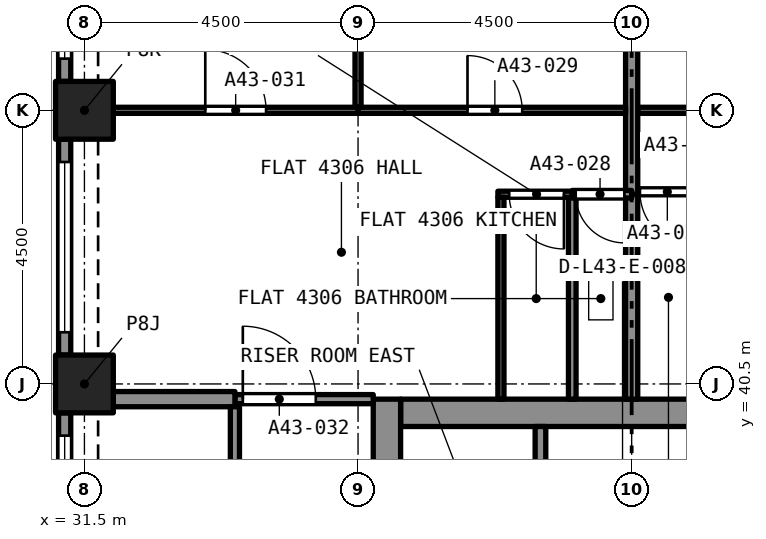
"""IFC4 building model, lengths in metres.
Left out: names, types, materials, properties, quantities, classifications, styles, units other than length and angle.
Written with IfcOpenShell. Run it as: python <this file> out.ifc"""

import sys

from ifc_helpers import new_model, si_unit, direction, frame, frame_2d, origin, origin_2d, place, context, subcontext, project, spatial, rectangle, extrude, element, fill, save


model = new_model("IFC4")
c1 = context("Model", 3, precision=1e-05, world=origin(), true_north=direction((0.0, 1.0)))
c2 = subcontext(c1, "Body", "Model", "MODEL_VIEW")
j1 = project(units=[si_unit("LENGTHUNIT", "METRE"), si_unit("PLANEANGLEUNIT", "RADIAN")], contexts=[c1])
p1 = place(None, origin())
s1 = spatial("IfcSite", under=j1, at=p1, CompositionType="ELEMENT")
p2 = place(p1, origin())
s2 = spatial("IfcBuilding", under=s1, at=p2, CompositionType="ELEMENT")
p3 = place(p2, frame((0.0, 0.0, 155.0)))
s3 = spatial("IfcBuildingStorey", under=s2, at=p3, CompositionType="ELEMENT", Elevation=155.0)
for number, where, z_axis, x_axis in (
    (1, (31.5, 40.5, 0.0), (0.0, 0.0, 1.0), (1.0, 0.0, 0.0)),
    (2, (31.5, 45.0, 0.0), (0.0, 0.0, 1.0), (1.0, 0.0, 0.0)),
):
    element("IfcColumn", number, at=place(p3, frame(where, z_axis=z_axis, x_axis=x_axis)), inside=s3, PredefinedType="COLUMN", context=c2, shape_type="SweptSolid", body=[
        extrude(rectangle(XDim=0.95, YDim=0.95, at=origin_2d()), origin(), (0.0, 0.0, 1.0), 4.4),
    ])
p4 = place(p3, frame((36.7, 40.025, 0.0), z_axis=(0.0, 0.0, 1.0), x_axis=(1.0, 0.0, 0.0)))
e3 = element("IfcWall", 3, at=p4, inside=s3, PredefinedType="SOLIDWALL", context=c2, shape_type="SweptSolid", body=[
    extrude(rectangle(XDim=7.6, YDim=0.45, at=frame_2d((3.8, 0.0))), origin(), (0.0, 0.0, 1.0), 4.4),
])
p5 = place(p3, frame((36.475, 27.25, 0.0), z_axis=(0.0, 0.0, 1.0), x_axis=(0.0, 1.0, 0.0)))
e4 = element("IfcWall", 4, at=p5, inside=s3, PredefinedType="SOLIDWALL", context=c2, shape_type="SweptSolid", body=[
    extrude(rectangle(XDim=13.0, YDim=0.45, at=frame_2d((6.5, 0.0))), origin(), (0.0, 0.0, 1.0), 4.4),
])
p6 = place(p5, frame((8.7, 0.0, 0.0)))
e5 = element("IfcOpeningElement", 5, at=p6, cuts=e4, PredefinedType="OPENING", context=c2, shape_type="SweptSolid", body=[
    extrude(rectangle(XDim=1.2, YDim=2.1, at=frame_2d((0.6, 1.05))), frame((0.0, 0.235, 0.0), z_axis=(0.0, -1.0, 0.0), x_axis=(1.0, 0.0, 0.0)), (0.0, 0.0, 1.0), 0.47),
])
p7 = place(p3, frame((31.175, 45.475, 0.0), z_axis=(0.0, 0.0, 1.0), x_axis=(0.0, 1.0, 0.0)))
e6 = element("IfcWall", 6, at=p7, inside=s3, PredefinedType="SOLIDWALL", context=c2, shape_type="SweptSolid", body=[
    extrude(rectangle(XDim=3.55, YDim=0.2, at=frame_2d((1.775, 0.0))), origin(), (0.0, 0.0, 1.0), 4.4),
])
p8 = place(p7, frame((0.375, 0.0, 0.45)))
e7 = element("IfcOpeningElement", 7, at=p8, cuts=e6, PredefinedType="OPENING", context=c2, shape_type="SweptSolid", body=[
    extrude(rectangle(XDim=2.8, YDim=2.55, at=frame_2d((1.4, 1.275))), frame((0.0, 0.11, 0.0), z_axis=(0.0, -1.0, 0.0), x_axis=(1.0, 0.0, 0.0)), (0.0, 0.0, 1.0), 0.22),
])
p9 = place(p3, frame((31.175, 40.975, 0.0), z_axis=(0.0, 0.0, 1.0), x_axis=(0.0, 1.0, 0.0)))
e8 = element("IfcWall", 8, at=p9, inside=s3, PredefinedType="SOLIDWALL", context=c2, shape_type="SweptSolid", body=[
    extrude(rectangle(XDim=3.55, YDim=0.2, at=frame_2d((1.775, 0.0))), origin(), (0.0, 0.0, 1.0), 4.4),
])
p10 = place(p9, frame((0.375, 0.0, 0.45)))
e9 = element("IfcOpeningElement", 9, at=p10, cuts=e8, PredefinedType="OPENING", context=c2, shape_type="SweptSolid", body=[
    extrude(rectangle(XDim=2.8, YDim=2.55, at=frame_2d((1.4, 1.275))), frame((0.0, 0.11, 0.0), z_axis=(0.0, -1.0, 0.0), x_axis=(1.0, 0.0, 0.0)), (0.0, 0.0, 1.0), 0.22),
])
p11 = place(p3, frame((31.175, 36.475, 0.0), z_axis=(0.0, 0.0, 1.0), x_axis=(0.0, 1.0, 0.0)))
e10 = element("IfcWall", 10, at=p11, inside=s3, PredefinedType="SOLIDWALL", context=c2, shape_type="SweptSolid", body=[
    extrude(rectangle(XDim=3.55, YDim=0.2, at=frame_2d((1.775, 0.0))), origin(), (0.0, 0.0, 1.0), 4.4),
])
p12 = place(p11, frame((0.375, 0.0, 0.45)))
e11 = element("IfcOpeningElement", 11, at=p12, cuts=e10, PredefinedType="OPENING", context=c2, shape_type="SweptSolid", body=[
    extrude(rectangle(XDim=2.8, YDim=2.55, at=frame_2d((1.4, 1.275))), frame((0.0, 0.11, 0.0), z_axis=(0.0, -1.0, 0.0), x_axis=(1.0, 0.0, 0.0)), (0.0, 0.0, 1.0), 0.22),
])
p13 = place(p3, frame((40.6, 45.0, 0.0), z_axis=(0.0, 0.0, 1.0), x_axis=(1.0, 0.0, 0.0)))
e12 = element("IfcWall", 12, at=p13, inside=s3, PredefinedType="PARTITIONING", context=c2, shape_type="SweptSolid", body=[
    extrude(rectangle(XDim=4.4, YDim=0.1, at=frame_2d((2.2, 0.0))), origin(), (0.0, 0.0, 1.0), 4.1),
])
p14 = place(p13, frame((1.7, 0.0, 0.0)))
e13 = element("IfcOpeningElement", 13, at=p14, cuts=e12, PredefinedType="OPENING", context=c2, shape_type="SweptSolid", body=[
    extrude(rectangle(XDim=0.9, YDim=2.1, at=frame_2d((0.45, 1.05))), frame((0.0, 0.06, 0.0), z_axis=(0.0, -1.0, 0.0), x_axis=(1.0, 0.0, 0.0)), (0.0, 0.0, 1.0), 0.12),
])
p15 = place(p3, frame((41.673, 43.66, 0.0), z_axis=(0.0, 0.0, 1.0), x_axis=(-1.0, 0.0, 0.0)))
e14 = element("IfcWall", 14, at=p15, inside=s3, PredefinedType="PARTITIONING", context=c2, shape_type="SweptSolid", body=[
    extrude(rectangle(XDim=1.073, YDim=0.1, at=frame_2d((0.536, 0.0))), origin(), (0.0, 0.0, 1.0), 4.1),
])
p16 = place(p15, frame((0.136, 0.0, 0.0)))
e15 = element("IfcOpeningElement", 15, at=p16, cuts=e14, PredefinedType="OPENING", context=c2, shape_type="SweptSolid", body=[
    extrude(rectangle(XDim=0.9, YDim=2.1, at=frame_2d((0.45, 1.05))), frame((0.0, 0.06, 0.0), z_axis=(0.0, -1.0, 0.0), x_axis=(1.0, 0.0, 0.0)), (0.0, 0.0, 1.0), 0.12),
])
p17 = place(p3, frame((40.5, 43.61, 0.0), z_axis=(0.0, 0.0, 1.0), x_axis=(0.0, 1.0, 0.0)))
e16 = element("IfcWall", 16, at=p17, inside=s3, PredefinedType="PARTITIONING", context=c2, shape_type="SweptSolid", body=[
    extrude(rectangle(XDim=5.415, YDim=0.2, at=frame_2d((2.708, 0.0))), origin(), (0.0, 0.0, 1.0), 4.1),
])
p18 = place(p3, frame((40.5, 40.25, 0.0), z_axis=(0.0, 0.0, 1.0), x_axis=(0.0, 1.0, 0.0)))
e17 = element("IfcWall", 17, at=p18, inside=s3, PredefinedType="PARTITIONING", context=c2, shape_type="SweptSolid", body=[
    extrude(rectangle(XDim=3.37, YDim=0.2, at=frame_2d((1.685, 0.0))), origin(), (0.0, 0.0, 1.0), 4.1),
])
p19 = place(p3, frame((40.5, 43.62, 0.0), z_axis=(0.0, 0.0, 1.0), x_axis=(-1.0, 0.0, 0.0)))
e18 = element("IfcWall", 18, at=p19, inside=s3, PredefinedType="PARTITIONING", context=c2, shape_type="SweptSolid", body=[
    extrude(rectangle(XDim=0.977, YDim=0.125, at=frame_2d((0.489, 0.0))), origin(), (0.0, 0.0, 1.0), 4.1),
])
p20 = place(p19, frame((0.12, 0.0, 0.0)))
e19 = element("IfcOpeningElement", 19, at=p20, cuts=e18, PredefinedType="OPENING", context=c2, shape_type="SweptSolid", body=[
    extrude(rectangle(XDim=0.8, YDim=2.1, at=frame_2d((0.4, 1.05))), frame((0.0, 0.073, 0.0), z_axis=(0.0, -1.0, 0.0), x_axis=(1.0, 0.0, 0.0)), (0.0, 0.0, 1.0), 0.145),
])
p21 = place(p3, frame((39.523, 40.25, 0.0), z_axis=(0.0, 0.0, 1.0), x_axis=(0.0, 1.0, 0.0)))
e20 = element("IfcWall", 20, at=p21, inside=s3, PredefinedType="PARTITIONING", context=c2, shape_type="SweptSolid", body=[
    extrude(rectangle(XDim=3.308, YDim=0.125, at=frame_2d((1.654, 0.0))), origin(), (0.0, 0.0, 1.0), 4.1),
])
p22 = place(p3, frame((36.0, 45.0, 0.0), z_axis=(0.0, 0.0, 1.0), x_axis=(1.0, 0.0, 0.0)))
e21 = element("IfcWall", 21, at=p22, inside=s3, PredefinedType="PARTITIONING", context=c2, shape_type="SweptSolid", body=[
    extrude(rectangle(XDim=4.4, YDim=0.1, at=frame_2d((2.2, 0.0))), origin(), (0.0, 0.0, 1.0), 4.1),
])
p23 = place(p22, frame((1.8, 0.0, 0.0)))
e22 = element("IfcOpeningElement", 22, at=p23, cuts=e21, PredefinedType="OPENING", context=c2, shape_type="SweptSolid", body=[
    extrude(rectangle(XDim=0.9, YDim=2.1, at=frame_2d((0.45, 1.05))), frame((0.0, 0.06, 0.0), z_axis=(0.0, -1.0, 0.0), x_axis=(1.0, 0.0, 0.0)), (0.0, 0.0, 1.0), 0.12),
])
p24 = place(p3, frame((36.0, 45.05, 0.0), z_axis=(0.0, 0.0, 1.0), x_axis=(0.0, 1.0, 0.0)))
e23 = element("IfcWall", 23, at=p24, inside=s3, PredefinedType="PARTITIONING", context=c2, shape_type="SweptSolid", body=[
    extrude(rectangle(XDim=3.975, YDim=0.1, at=frame_2d((1.987, 0.0))), origin(), (0.0, 0.0, 1.0), 4.1),
])
p25 = place(p3, frame((39.523, 43.62, 0.0), z_axis=(0.0, 0.0, 1.0), x_axis=(-1.0, 0.0, 0.0)))
e24 = element("IfcWall", 24, at=p25, inside=s3, PredefinedType="PARTITIONING", context=c2, shape_type="SweptSolid", body=[
    extrude(rectangle(XDim=1.223, YDim=0.1, at=frame_2d((0.611, 0.0))), origin(), (0.0, 0.0, 1.0), 4.1),
])
p26 = place(p25, frame((0.136, 0.0, 0.0)))
e25 = element("IfcOpeningElement", 25, at=p26, cuts=e24, PredefinedType="OPENING", context=c2, shape_type="SweptSolid", body=[
    extrude(rectangle(XDim=0.9, YDim=2.1, at=frame_2d((0.45, 1.05))), frame((0.0, 0.06, 0.0), z_axis=(0.0, -1.0, 0.0), x_axis=(1.0, 0.0, 0.0)), (0.0, 0.0, 1.0), 0.12),
])
p27 = place(p3, frame((38.35, 40.25, 0.0), z_axis=(0.0, 0.0, 1.0), x_axis=(0.0, 1.0, 0.0)))
e26 = element("IfcWall", 26, at=p27, inside=s3, PredefinedType="PARTITIONING", context=c2, shape_type="SweptSolid", body=[
    extrude(rectangle(XDim=3.32, YDim=0.1, at=frame_2d((1.66, 0.0))), origin(), (0.0, 0.0, 1.0), 4.1),
])
p28 = place(p3, frame((31.975, 45.0, 0.0), z_axis=(0.0, 0.0, 1.0), x_axis=(1.0, 0.0, 0.0)))
e27 = element("IfcWall", 27, at=p28, inside=s3, PredefinedType="PARTITIONING", context=c2, shape_type="SweptSolid", body=[
    extrude(rectangle(XDim=4.025, YDim=0.1, at=frame_2d((2.012, 0.0))), origin(), (0.0, 0.0, 1.0), 4.1),
])
p29 = place(p28, frame((1.512, 0.0, 0.0)))
e28 = element("IfcOpeningElement", 28, at=p29, cuts=e27, PredefinedType="OPENING", context=c2, shape_type="SweptSolid", body=[
    extrude(rectangle(XDim=1.0, YDim=2.1, at=frame_2d((0.5, 1.05))), frame((0.0, 0.06, 0.0), z_axis=(0.0, -1.0, 0.0), x_axis=(1.0, 0.0, 0.0)), (0.0, 0.0, 1.0), 0.12),
])
p30 = place(p3, frame((33.975, 40.25, 0.0), z_axis=(0.0, 0.0, 1.0), x_axis=(1.0, 0.0, 0.0)))
e29 = element("IfcWall", 29, at=p30, inside=s3, PredefinedType="PARTITIONING", context=c2, shape_type="SweptSolid", body=[
    extrude(rectangle(XDim=2.275, YDim=0.15, at=frame_2d((1.137, 0.0))), origin(), (0.0, 0.0, 1.0), 4.1),
])
p31 = place(p30, frame((0.13, 0.0, 0.0)))
e30 = element("IfcOpeningElement", 30, at=p31, cuts=e29, PredefinedType="OPENING", context=c2, shape_type="SweptSolid", body=[
    extrude(rectangle(XDim=1.2, YDim=2.4, at=frame_2d((0.6, 1.2))), frame((0.0, 0.085, 0.0), z_axis=(0.0, -1.0, 0.0), x_axis=(1.0, 0.0, 0.0)), (0.0, 0.0, 1.0), 0.17),
])
p32 = place(p3, frame((31.975, 40.25, 0.0), z_axis=(0.0, 0.0, 1.0), x_axis=(1.0, 0.0, 0.0)))
e31 = element("IfcWall", 31, at=p32, inside=s3, PredefinedType="PARTITIONING", context=c2, shape_type="SweptSolid", body=[
    extrude(rectangle(XDim=2.0, YDim=0.25, at=frame_2d((1.0, 0.0))), origin(), (0.0, 0.0, 1.0), 4.1),
])
p33 = place(p3, frame((33.975, 27.175, 0.0), z_axis=(0.0, 0.0, 1.0), x_axis=(0.0, 1.0, 0.0)))
e32 = element("IfcWall", 32, at=p33, inside=s3, PredefinedType="PARTITIONING", context=c2, shape_type="SweptSolid", body=[
    extrude(rectangle(XDim=12.95, YDim=0.15, at=frame_2d((6.475, 0.0))), origin(), (0.0, 0.0, 1.0), 4.1),
])
p34 = place(p33, frame((6.075, 0.0, 0.0)))
e33 = element("IfcOpeningElement", 33, at=p34, cuts=e32, PredefinedType="OPENING", context=c2, shape_type="SweptSolid", body=[
    extrude(rectangle(XDim=1.0, YDim=2.1, at=frame_2d((0.5, 1.05))), frame((0.0, 0.085, 0.0), z_axis=(0.0, -1.0, 0.0), x_axis=(1.0, 0.0, 0.0)), (0.0, 0.0, 1.0), 0.17),
])
p35 = place(p3, frame((39.0, 37.5, 0.0), z_axis=(0.0, 0.0, 1.0), x_axis=(0.0, 1.0, 0.0)))
e34 = element("IfcWall", 34, at=p35, inside=s3, PredefinedType="SOLIDWALL", context=c2, shape_type="SweptSolid", body=[
    extrude(rectangle(XDim=2.3, YDim=0.175, at=frame_2d((1.15, 0.0))), origin(), (0.0, 0.0, 1.0), 4.1),
])
p36 = place(p8, origin())
e35 = element("IfcWindow", 35, at=p36, inside=s3, PartitioningType="SINGLE_PANEL", PredefinedType="WINDOW", context=c2, shape_type="SweptSolid", body=[
    extrude(rectangle(XDim=2.8, YDim=2.55, at=frame_2d((1.4, 1.275))), frame((0.0, 0.03, 0.0), z_axis=(0.0, -1.0, 0.0), x_axis=(1.0, 0.0, 0.0)), (0.0, 0.0, 1.0), 0.06),
])
fill(e7, e35)
p37 = place(p10, origin())
e36 = element("IfcWindow", 36, at=p37, inside=s3, PartitioningType="SINGLE_PANEL", PredefinedType="WINDOW", context=c2, shape_type="SweptSolid", body=[
    extrude(rectangle(XDim=2.8, YDim=2.55, at=frame_2d((1.4, 1.275))), frame((0.0, 0.03, 0.0), z_axis=(0.0, -1.0, 0.0), x_axis=(1.0, 0.0, 0.0)), (0.0, 0.0, 1.0), 0.06),
])
fill(e9, e36)
p38 = place(p12, origin())
e37 = element("IfcWindow", 37, at=p38, inside=s3, PartitioningType="SINGLE_PANEL", PredefinedType="WINDOW", context=c2, shape_type="SweptSolid", body=[
    extrude(rectangle(XDim=2.8, YDim=2.55, at=frame_2d((1.4, 1.275))), frame((0.0, 0.03, 0.0), z_axis=(0.0, -1.0, 0.0), x_axis=(1.0, 0.0, 0.0)), (0.0, 0.0, 1.0), 0.06),
])
fill(e11, e37)
p39 = place(p16, origin())
e38 = element("IfcDoor", 38, at=p39, inside=s3, OperationType="SINGLE_SWING_RIGHT", PredefinedType="DOOR", context=c2, shape_type="SweptSolid", body=[
    extrude(rectangle(XDim=0.9, YDim=2.1, at=frame_2d((0.45, 1.05))), frame((0.0, 0.025, 0.0), z_axis=(0.0, -1.0, 0.0), x_axis=(1.0, 0.0, 0.0)), (0.0, 0.0, 1.0), 0.05),
])
fill(e15, e38)
p40 = place(p20, origin())
e39 = element("IfcDoor", 39, at=p40, inside=s3, OperationType="SINGLE_SWING_LEFT", PredefinedType="DOOR", context=c2, shape_type="SweptSolid", body=[
    extrude(rectangle(XDim=0.8, YDim=2.1, at=frame_2d((0.4, 1.05))), frame((0.0, 0.025, 0.0), z_axis=(0.0, -1.0, 0.0), x_axis=(1.0, 0.0, 0.0)), (0.0, 0.0, 1.0), 0.05),
])
fill(e19, e39)
p41 = place(p23, origin())
e40 = element("IfcDoor", 40, at=p41, inside=s3, OperationType="SINGLE_SWING_RIGHT", PredefinedType="DOOR", context=c2, shape_type="SweptSolid", body=[
    extrude(rectangle(XDim=0.9, YDim=2.1, at=frame_2d((0.45, 1.05))), frame((0.0, 0.025, 0.0), z_axis=(0.0, -1.0, 0.0), x_axis=(1.0, 0.0, 0.0)), (0.0, 0.0, 1.0), 0.05),
])
fill(e22, e40)
p42 = place(p26, origin())
e41 = element("IfcDoor", 41, at=p42, inside=s3, OperationType="SINGLE_SWING_LEFT", PredefinedType="DOOR", context=c2, shape_type="SweptSolid", body=[
    extrude(rectangle(XDim=0.9, YDim=2.1, at=frame_2d((0.45, 1.05))), frame((0.0, 0.025, 0.0), z_axis=(0.0, -1.0, 0.0), x_axis=(1.0, 0.0, 0.0)), (0.0, 0.0, 1.0), 0.05),
])
fill(e25, e41)
p43 = place(p29, origin())
e42 = element("IfcDoor", 42, at=p43, inside=s3, OperationType="SINGLE_SWING_LEFT", PredefinedType="DOOR", context=c2, shape_type="SweptSolid", body=[
    extrude(rectangle(XDim=1.0, YDim=2.1, at=frame_2d((0.5, 1.05))), frame((0.0, 0.025, 0.0), z_axis=(0.0, -1.0, 0.0), x_axis=(1.0, 0.0, 0.0)), (0.0, 0.0, 1.0), 0.05),
])
fill(e28, e42)
p44 = place(p31, origin())
e43 = element("IfcDoor", 43, at=p44, inside=s3, OperationType="SINGLE_SWING_LEFT", PredefinedType="DOOR", context=c2, shape_type="SweptSolid", body=[
    extrude(rectangle(XDim=1.2, YDim=2.4, at=frame_2d((0.6, 1.2))), frame((0.0, 0.025, 0.0), z_axis=(0.0, -1.0, 0.0), x_axis=(1.0, 0.0, 0.0)), (0.0, 0.0, 1.0), 0.05),
])
fill(e30, e43)
save(model, sys.argv[1])
